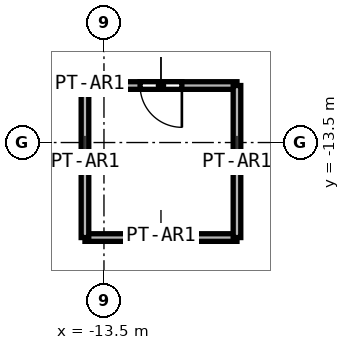
"""IFC4 building model, lengths in metres.
Left out: names, types, materials, properties, quantities, classifications, styles, units other than length and angle.
Written with IfcOpenShell. Run it as: python <this file> out.ifc"""

import sys

from ifc_helpers import new_model, si_unit, direction, frame, frame_2d, origin, place, context, subcontext, project, spatial, rectangle, extrude, element, fill, save


model = new_model("IFC4")
c1 = context("Model", 3, precision=1e-05, world=origin(), true_north=direction((0.0, 1.0)))
c2 = subcontext(c1, "Body", "Model", "MODEL_VIEW")
j1 = project(units=[si_unit("LENGTHUNIT", "METRE"), si_unit("PLANEANGLEUNIT", "RADIAN")], contexts=[c1])
p1 = place(None, origin())
s1 = spatial("IfcSite", under=j1, at=p1, CompositionType="ELEMENT")
p2 = place(p1, origin())
s2 = spatial("IfcBuilding", under=s1, at=p2, CompositionType="ELEMENT")
p3 = place(p2, origin())
s3 = spatial("IfcBuildingStorey", under=s2, at=p3, CompositionType="ELEMENT", Elevation=0.0)
p4 = place(p3, frame((-14.0, -16.0, 0.0), z_axis=(0.0, 0.0, 1.0), x_axis=(1.0, 0.0, 0.0)))
e1 = element("IfcWall", 1, at=p4, inside=s3, PredefinedType="PARTITIONING", context=c2, shape_type="SweptSolid", body=[
    extrude(rectangle(XDim=4.0, YDim=0.2, at=frame_2d((2.0, 0.0))), origin(), (0.0, 0.0, 1.0), 11.7),
])
p5 = place(p3, frame((-10.0, -12.0, 0.0), z_axis=(0.0, 0.0, 1.0), x_axis=(-1.0, 0.0, 0.0)))
e2 = element("IfcWall", 2, at=p5, inside=s3, PredefinedType="PARTITIONING", context=c2, shape_type="SweptSolid", body=[
    extrude(rectangle(XDim=4.0, YDim=0.2, at=frame_2d((2.0, 0.0))), origin(), (0.0, 0.0, 1.0), 11.7),
])
p6 = place(p5, frame((1.45, 0.0, 0.0)))
e3 = element("IfcOpeningElement", 3, at=p6, cuts=e2, PredefinedType="OPENING", context=c2, shape_type="SweptSolid", body=[
    extrude(rectangle(XDim=1.1, YDim=2.4, at=frame_2d((0.55, 1.2))), frame((0.0, 0.1, 0.0), z_axis=(0.0, -1.0, 0.0), x_axis=(1.0, 0.0, 0.0)), (0.0, 0.0, 1.0), 0.2),
])
for number, where, z_axis, x_axis in (
    (4, (-14.0, -12.0, 0.0), (0.0, 0.0, 1.0), (0.0, -1.0, 0.0)),
    (5, (-10.0, -16.0, 0.0), (0.0, 0.0, 1.0), (0.0, 1.0, 0.0)),
):
    element("IfcWall", number, at=place(p3, frame(where, z_axis=z_axis, x_axis=x_axis)), inside=s3, PredefinedType="PARTITIONING", context=c2, shape_type="SweptSolid", body=[
        extrude(rectangle(XDim=4.0, YDim=0.2, at=frame_2d((2.0, 0.0))), origin(), (0.0, 0.0, 1.0), 11.7),
    ])
p7 = place(p6, origin())
e6 = element("IfcDoor", 6, at=p7, inside=s3, OperationType="DOUBLE_DOOR_SINGLE_SWING", PredefinedType="DOOR", context=c2, shape_type="SweptSolid", body=[
    extrude(rectangle(XDim=1.1, YDim=2.4, at=frame_2d((0.55, 1.2))), frame((0.0, 0.025, 0.0), z_axis=(0.0, -1.0, 0.0), x_axis=(1.0, 0.0, 0.0)), (0.0, 0.0, 1.0), 0.05),
])
fill(e3, e6)
save(model, sys.argv[1])
